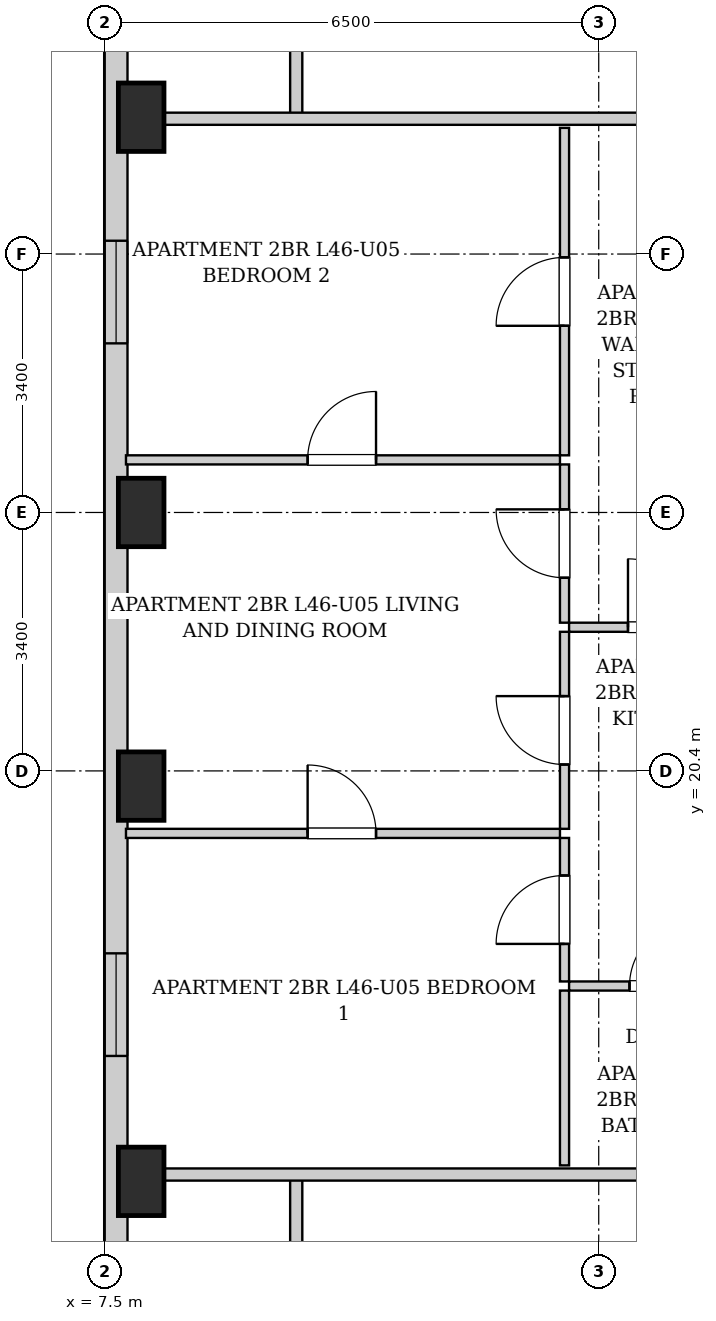
"""IFC4 building model, lengths in metres.
Left out: names, types, materials, properties, quantities, classifications, styles, units other than length and angle.
Written with IfcOpenShell. Run it as: python <this file> out.ifc"""

import sys

from ifc_helpers import new_model, si_unit, direction, frame, frame_2d, origin, origin_2d, place, context, subcontext, project, spatial, rectangle, extrude, element, fill, save


model = new_model("IFC4")
c1 = context("Model", 3, precision=1e-05, world=origin(), true_north=direction((0.0, 1.0)))
c2 = subcontext(c1, "Body", "Model", "MODEL_VIEW")
j1 = project(units=[si_unit("LENGTHUNIT", "METRE"), si_unit("PLANEANGLEUNIT", "RADIAN")], contexts=[c1])
p1 = place(None, origin())
s1 = spatial("IfcSite", under=j1, at=p1, CompositionType="ELEMENT")
p2 = place(p1, origin())
s2 = spatial("IfcBuilding", under=s1, at=p2, CompositionType="ELEMENT")
p3 = place(p2, frame((0.0, 0.0, 160.15)))
s3 = spatial("IfcBuildingStorey", under=s2, at=p3, CompositionType="ELEMENT", Elevation=160.15)
for number, where, z_axis, x_axis in (
    (1, (7.98, 15.0, 0.0), (0.0, 0.0, 1.0), (1.0, 0.0, 0.0)),
    (2, (7.98, 20.2, 0.0), (0.0, 0.0, 1.0), (1.0, 0.0, 0.0)),
    (3, (7.98, 23.8, 0.0), (0.0, 0.0, 1.0), (1.0, 0.0, 0.0)),
    (4, (7.98, 29.0, 0.0), (0.0, 0.0, 1.0), (1.0, 0.0, 0.0)),
):
    element("IfcColumn", number, at=place(p3, frame(where, z_axis=z_axis, x_axis=x_axis)), inside=s3, PredefinedType="COLUMN", context=c2, shape_type="SweptSolid", body=[
        extrude(rectangle(XDim=0.6, YDim=0.9, at=origin_2d()), origin(), (0.0, 0.0, 1.0), 3.25),
    ])
p4 = place(p3, frame((7.65, 6.3, 0.0), z_axis=(0.0, 0.0, 1.0), x_axis=(0.0, 1.0, 0.0)))
e5 = element("IfcWall", 5, at=p4, inside=s3, PredefinedType="SOLIDWALL", context=c2, shape_type="SweptSolid", body=[
    extrude(rectangle(XDim=34.5, YDim=0.3, at=frame_2d((17.25, 0.0))), origin(), (0.0, 0.0, 1.0), 2.99),
])
p5 = place(p4, frame((30.075, 0.0, 0.55)))
e6 = element("IfcOpeningElement", 6, at=p5, cuts=e5, PredefinedType="OPENING", context=c2, shape_type="SweptSolid", body=[
    extrude(rectangle(XDim=1.35, YDim=1.2, at=frame_2d((0.675, 0.6))), frame((0.0, 0.16, 0.0), z_axis=(0.0, -1.0, 0.0), x_axis=(1.0, 0.0, 0.0)), (0.0, 0.0, 1.0), 0.32),
])
p6 = place(p4, frame((28.31, 0.0, 0.55)))
e7 = element("IfcOpeningElement", 7, at=p6, cuts=e5, PredefinedType="OPENING", context=c2, shape_type="SweptSolid", body=[
    extrude(rectangle(XDim=1.35, YDim=1.2, at=frame_2d((0.675, 0.6))), frame((0.0, 0.16, 0.0), z_axis=(0.0, -1.0, 0.0), x_axis=(1.0, 0.0, 0.0)), (0.0, 0.0, 1.0), 0.32),
])
p7 = place(p4, frame((10.35, 0.0, 0.55)))
e8 = element("IfcOpeningElement", 8, at=p7, cuts=e5, PredefinedType="OPENING", context=c2, shape_type="SweptSolid", body=[
    extrude(rectangle(XDim=1.35, YDim=1.2, at=frame_2d((0.675, 0.6))), frame((0.0, 0.16, 0.0), z_axis=(0.0, -1.0, 0.0), x_axis=(1.0, 0.0, 0.0)), (0.0, 0.0, 1.0), 0.32),
])
p8 = place(p4, frame((19.725, 0.0, 0.55)))
e9 = element("IfcOpeningElement", 9, at=p8, cuts=e5, PredefinedType="OPENING", context=c2, shape_type="SweptSolid", body=[
    extrude(rectangle(XDim=1.35, YDim=1.2, at=frame_2d((0.675, 0.6))), frame((0.0, 0.16, 0.0), z_axis=(0.0, -1.0, 0.0), x_axis=(1.0, 0.0, 0.0)), (0.0, 0.0, 1.0), 0.32),
])
for number, where, z_axis, x_axis in (
    (10, (10.02, 13.35, 0.0), (0.0, 0.0, 1.0), (0.0, 1.0, 0.0)),
    (11, (10.02, 28.98, 0.0), (0.0, 0.0, 1.0), (0.0, 1.0, 0.0)),
):
    element("IfcWall", number, at=place(p3, frame(where, z_axis=z_axis, x_axis=x_axis)), inside=s3, PredefinedType="PARTITIONING", context=c2, shape_type="SweptSolid", body=[
        extrude(rectangle(XDim=1.74, YDim=0.16, at=frame_2d((0.87, 0.0))), origin(), (0.0, 0.0, 1.0), 2.99),
    ])
for number, where, z_axis, x_axis in (
    (12, (7.78, 15.09, 0.0), (0.0, 0.0, 1.0), (1.0, 0.0, 0.0)),
    (13, (7.78, 28.98, 0.0), (0.0, 0.0, 1.0), (1.0, 0.0, 0.0)),
):
    element("IfcWall", number, at=place(p3, frame(where, z_axis=z_axis, x_axis=x_axis)), inside=s3, PredefinedType="PARTITIONING", context=c2, shape_type="SweptSolid", body=[
        extrude(rectangle(XDim=8.36, YDim=0.16, at=frame_2d((4.18, 0.0))), origin(), (0.0, 0.0, 1.0), 2.442),
    ])
p9 = place(p3, frame((13.61, 22.29, 0.0), z_axis=(0.0, 0.0, 1.0), x_axis=(1.0, 0.0, 0.0)))
e14 = element("IfcWall", 14, at=p9, inside=s3, PredefinedType="PARTITIONING", context=c2, shape_type="SweptSolid", body=[
    extrude(rectangle(XDim=2.45, YDim=0.12, at=frame_2d((1.225, 0.0))), origin(), (0.0, 0.0, 1.0), 2.99),
])
p10 = place(p9, frame((0.775, 0.0, 0.0)))
e15 = element("IfcOpeningElement", 15, at=p10, cuts=e14, PredefinedType="OPENING", context=c2, shape_type="SweptSolid", body=[
    extrude(rectangle(XDim=0.9, YDim=2.05, at=frame_2d((0.45, 1.025))), frame((0.0, 0.07, 0.0), z_axis=(0.0, -1.0, 0.0), x_axis=(1.0, 0.0, 0.0)), (0.0, 0.0, 1.0), 0.14),
])
p11 = place(p3, frame((13.55, 22.35, 0.0), z_axis=(0.0, 0.0, 1.0), x_axis=(0.0, 1.0, 0.0)))
e16 = element("IfcWall", 16, at=p11, inside=s3, PredefinedType="PARTITIONING", context=c2, shape_type="SweptSolid", body=[
    extrude(rectangle(XDim=2.082, YDim=0.12, at=frame_2d((1.041, 0.0))), origin(), (0.0, 0.0, 1.0), 2.99),
])
p12 = place(p11, frame((0.591, 0.0, 0.0)))
e17 = element("IfcOpeningElement", 17, at=p12, cuts=e16, PredefinedType="OPENING", context=c2, shape_type="SweptSolid", body=[
    extrude(rectangle(XDim=0.9, YDim=2.05, at=frame_2d((0.45, 1.025))), frame((0.0, 0.07, 0.0), z_axis=(0.0, -1.0, 0.0), x_axis=(1.0, 0.0, 0.0)), (0.0, 0.0, 1.0), 0.14),
])
p13 = place(p3, frame((13.55, 24.552, 0.0), z_axis=(0.0, 0.0, 1.0), x_axis=(0.0, 1.0, 0.0)))
e18 = element("IfcWall", 18, at=p13, inside=s3, PredefinedType="PARTITIONING", context=c2, shape_type="SweptSolid", body=[
    extrude(rectangle(XDim=4.308, YDim=0.12, at=frame_2d((2.154, 0.0))), origin(), (0.0, 0.0, 1.0), 2.99),
])
p14 = place(p13, frame((1.704, 0.0, 0.0)))
e19 = element("IfcOpeningElement", 19, at=p14, cuts=e18, PredefinedType="OPENING", context=c2, shape_type="SweptSolid", body=[
    extrude(rectangle(XDim=0.9, YDim=2.05, at=frame_2d((0.45, 1.025))), frame((0.0, 0.07, 0.0), z_axis=(0.0, -1.0, 0.0), x_axis=(1.0, 0.0, 0.0)), (0.0, 0.0, 1.0), 0.14),
])
p15 = place(p3, frame((13.61, 17.57, 0.0), z_axis=(0.0, 0.0, 1.0), x_axis=(1.0, 0.0, 0.0)))
e20 = element("IfcWall", 20, at=p15, inside=s3, PredefinedType="PARTITIONING", context=c2, shape_type="SweptSolid", body=[
    extrude(rectangle(XDim=2.45, YDim=0.12, at=frame_2d((1.225, 0.0))), origin(), (0.0, 0.0, 1.0), 2.99),
])
p16 = place(p15, frame((0.795, 0.0, 0.0)))
e21 = element("IfcOpeningElement", 21, at=p16, cuts=e20, PredefinedType="OPENING", context=c2, shape_type="SweptSolid", body=[
    extrude(rectangle(XDim=0.86, YDim=2.05, at=frame_2d((0.43, 1.025))), frame((0.0, 0.07, 0.0), z_axis=(0.0, -1.0, 0.0), x_axis=(1.0, 0.0, 0.0)), (0.0, 0.0, 1.0), 0.14),
])
p17 = place(p3, frame((13.55, 15.21, 0.0), z_axis=(0.0, 0.0, 1.0), x_axis=(0.0, 1.0, 0.0)))
e22 = element("IfcWall", 22, at=p17, inside=s3, PredefinedType="PARTITIONING", context=c2, shape_type="SweptSolid", body=[
    extrude(rectangle(XDim=2.3, YDim=0.12, at=frame_2d((1.15, 0.0))), origin(), (0.0, 0.0, 1.0), 2.99),
])
p18 = place(p3, frame((13.55, 17.63, 0.0), z_axis=(0.0, 0.0, 1.0), x_axis=(0.0, 1.0, 0.0)))
e23 = element("IfcWall", 23, at=p18, inside=s3, PredefinedType="PARTITIONING", context=c2, shape_type="SweptSolid", body=[
    extrude(rectangle(XDim=1.888, YDim=0.12, at=frame_2d((0.944, 0.0))), origin(), (0.0, 0.0, 1.0), 2.99),
])
p19 = place(p18, frame((0.494, 0.0, 0.0)))
e24 = element("IfcOpeningElement", 24, at=p19, cuts=e23, PredefinedType="OPENING", context=c2, shape_type="SweptSolid", body=[
    extrude(rectangle(XDim=0.9, YDim=2.05, at=frame_2d((0.45, 1.025))), frame((0.0, 0.07, 0.0), z_axis=(0.0, -1.0, 0.0), x_axis=(1.0, 0.0, 0.0)), (0.0, 0.0, 1.0), 0.14),
])
p20 = place(p3, frame((13.55, 19.638, 0.0), z_axis=(0.0, 0.0, 1.0), x_axis=(0.0, 1.0, 0.0)))
e25 = element("IfcWall", 25, at=p20, inside=s3, PredefinedType="PARTITIONING", context=c2, shape_type="SweptSolid", body=[
    extrude(rectangle(XDim=2.592, YDim=0.12, at=frame_2d((1.296, 0.0))), origin(), (0.0, 0.0, 1.0), 2.99),
])
p21 = place(p20, frame((0.846, 0.0, 0.0)))
e26 = element("IfcOpeningElement", 26, at=p21, cuts=e25, PredefinedType="OPENING", context=c2, shape_type="SweptSolid", body=[
    extrude(rectangle(XDim=0.9, YDim=2.05, at=frame_2d((0.45, 1.025))), frame((0.0, 0.07, 0.0), z_axis=(0.0, -1.0, 0.0), x_axis=(1.0, 0.0, 0.0)), (0.0, 0.0, 1.0), 0.14),
])
p22 = place(p3, frame((7.78, 19.578, 0.0), z_axis=(0.0, 0.0, 1.0), x_axis=(1.0, 0.0, 0.0)))
e27 = element("IfcWall", 27, at=p22, inside=s3, PredefinedType="PARTITIONING", context=c2, shape_type="SweptSolid", body=[
    extrude(rectangle(XDim=5.71, YDim=0.12, at=frame_2d((2.855, 0.0))), origin(), (0.0, 0.0, 1.0), 2.99),
])
p23 = place(p22, frame((2.39, 0.0, 0.0)))
e28 = element("IfcOpeningElement", 28, at=p23, cuts=e27, PredefinedType="OPENING", context=c2, shape_type="SweptSolid", body=[
    extrude(rectangle(XDim=0.9, YDim=2.05, at=frame_2d((0.45, 1.025))), frame((0.0, 0.07, 0.0), z_axis=(0.0, -1.0, 0.0), x_axis=(1.0, 0.0, 0.0)), (0.0, 0.0, 1.0), 0.14),
])
p24 = place(p3, frame((7.78, 24.492, 0.0), z_axis=(0.0, 0.0, 1.0), x_axis=(1.0, 0.0, 0.0)))
e29 = element("IfcWall", 29, at=p24, inside=s3, PredefinedType="PARTITIONING", context=c2, shape_type="SweptSolid", body=[
    extrude(rectangle(XDim=5.71, YDim=0.12, at=frame_2d((2.855, 0.0))), origin(), (0.0, 0.0, 1.0), 2.621),
])
p25 = place(p24, frame((2.39, 0.0, 0.0)))
e30 = element("IfcOpeningElement", 30, at=p25, cuts=e29, PredefinedType="OPENING", context=c2, shape_type="SweptSolid", body=[
    extrude(rectangle(XDim=0.9, YDim=2.05, at=frame_2d((0.45, 1.025))), frame((0.0, 0.07, 0.0), z_axis=(0.0, -1.0, 0.0), x_axis=(1.0, 0.0, 0.0)), (0.0, 0.0, 1.0), 0.14),
])
p26 = place(p10, origin())
e31 = element("IfcDoor", 31, at=p26, inside=s3, OperationType="SINGLE_SWING_LEFT", PredefinedType="DOOR", context=c2, shape_type="SweptSolid", body=[
    extrude(rectangle(XDim=0.9, YDim=2.05, at=frame_2d((0.45, 1.025))), frame((0.0, 0.025, 0.0), z_axis=(0.0, -1.0, 0.0), x_axis=(1.0, 0.0, 0.0)), (0.0, 0.0, 1.0), 0.05),
])
fill(e15, e31)
p27 = place(p12, origin())
e32 = element("IfcDoor", 32, at=p27, inside=s3, OperationType="SINGLE_SWING_RIGHT", PredefinedType="DOOR", context=c2, shape_type="SweptSolid", body=[
    extrude(rectangle(XDim=0.9, YDim=2.05, at=frame_2d((0.45, 1.025))), frame((0.0, 0.025, 0.0), z_axis=(0.0, -1.0, 0.0), x_axis=(1.0, 0.0, 0.0)), (0.0, 0.0, 1.0), 0.05),
])
fill(e17, e32)
p28 = place(p14, origin())
e33 = element("IfcDoor", 33, at=p28, inside=s3, OperationType="SINGLE_SWING_LEFT", PredefinedType="DOOR", context=c2, shape_type="SweptSolid", body=[
    extrude(rectangle(XDim=0.9, YDim=2.05, at=frame_2d((0.45, 1.025))), frame((0.0, 0.025, 0.0), z_axis=(0.0, -1.0, 0.0), x_axis=(1.0, 0.0, 0.0)), (0.0, 0.0, 1.0), 0.05),
])
fill(e19, e33)
p29 = place(p16, origin())
e34 = element("IfcDoor", 34, at=p29, inside=s3, OperationType="SINGLE_SWING_RIGHT", PredefinedType="DOOR", context=c2, shape_type="SweptSolid", body=[
    extrude(rectangle(XDim=0.86, YDim=2.05, at=frame_2d((0.43, 1.025))), frame((0.0, 0.025, 0.0), z_axis=(0.0, -1.0, 0.0), x_axis=(1.0, 0.0, 0.0)), (0.0, 0.0, 1.0), 0.05),
])
fill(e21, e34)
p30 = place(p19, origin())
e35 = element("IfcDoor", 35, at=p30, inside=s3, OperationType="SINGLE_SWING_LEFT", PredefinedType="DOOR", context=c2, shape_type="SweptSolid", body=[
    extrude(rectangle(XDim=0.9, YDim=2.05, at=frame_2d((0.45, 1.025))), frame((0.0, 0.025, 0.0), z_axis=(0.0, -1.0, 0.0), x_axis=(1.0, 0.0, 0.0)), (0.0, 0.0, 1.0), 0.05),
])
fill(e24, e35)
p31 = place(p21, origin())
e36 = element("IfcDoor", 36, at=p31, inside=s3, OperationType="SINGLE_SWING_RIGHT", PredefinedType="DOOR", context=c2, shape_type="SweptSolid", body=[
    extrude(rectangle(XDim=0.9, YDim=2.05, at=frame_2d((0.45, 1.025))), frame((0.0, 0.025, 0.0), z_axis=(0.0, -1.0, 0.0), x_axis=(1.0, 0.0, 0.0)), (0.0, 0.0, 1.0), 0.05),
])
fill(e26, e36)
p32 = place(p23, origin())
e37 = element("IfcDoor", 37, at=p32, inside=s3, OperationType="SINGLE_SWING_LEFT", PredefinedType="DOOR", context=c2, shape_type="SweptSolid", body=[
    extrude(rectangle(XDim=0.9, YDim=2.05, at=frame_2d((0.45, 1.025))), frame((0.0, 0.025, 0.0), z_axis=(0.0, -1.0, 0.0), x_axis=(1.0, 0.0, 0.0)), (0.0, 0.0, 1.0), 0.05),
])
fill(e28, e37)
p33 = place(p25, origin())
e38 = element("IfcDoor", 38, at=p33, inside=s3, OperationType="SINGLE_SWING_RIGHT", PredefinedType="DOOR", context=c2, shape_type="SweptSolid", body=[
    extrude(rectangle(XDim=0.9, YDim=2.05, at=frame_2d((0.45, 1.025))), frame((0.0, 0.025, 0.0), z_axis=(0.0, -1.0, 0.0), x_axis=(1.0, 0.0, 0.0)), (0.0, 0.0, 1.0), 0.05),
])
fill(e30, e38)
p34 = place(p7, origin())
e39 = element("IfcWindow", 39, at=p34, inside=s3, PartitioningType="SINGLE_PANEL", PredefinedType="WINDOW", context=c2, shape_type="SweptSolid", body=[
    extrude(rectangle(XDim=1.35, YDim=1.2, at=frame_2d((0.675, 0.6))), frame((0.0, 0.03, 0.0), z_axis=(0.0, -1.0, 0.0), x_axis=(1.0, 0.0, 0.0)), (0.0, 0.0, 1.0), 0.06),
])
fill(e8, e39)
p35 = place(p8, origin())
e40 = element("IfcWindow", 40, at=p35, inside=s3, PartitioningType="SINGLE_PANEL", PredefinedType="WINDOW", context=c2, shape_type="SweptSolid", body=[
    extrude(rectangle(XDim=1.35, YDim=1.2, at=frame_2d((0.675, 0.6))), frame((0.0, 0.03, 0.0), z_axis=(0.0, -1.0, 0.0), x_axis=(1.0, 0.0, 0.0)), (0.0, 0.0, 1.0), 0.06),
])
fill(e9, e40)
save(model, sys.argv[1])
